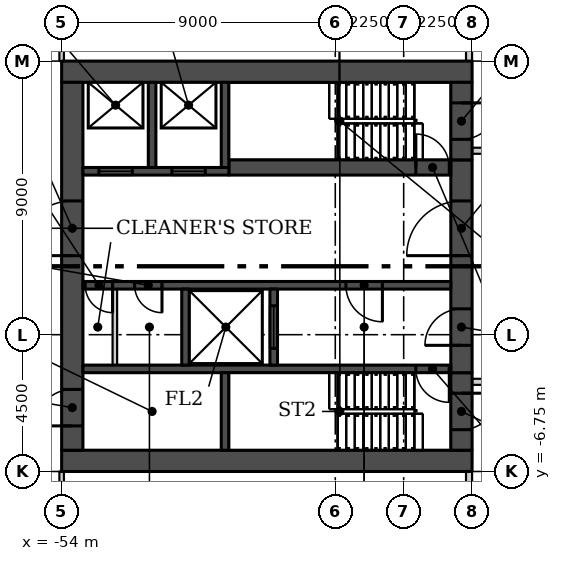
"""IFC4 building model, lengths in metres.
Left out: names, types, materials, properties, quantities, classifications, styles, units other than length and angle.
Written with IfcOpenShell. Run it as: python <this file> out.ifc"""

import sys

from ifc_helpers import new_model, si_unit, direction, frame, frame_2d, origin, place, context, subcontext, project, spatial, rectangle, extrude, element, fill, save


model = new_model("IFC4")
c1 = context("Model", 3, precision=1e-05, world=origin(), true_north=direction((0.0, 1.0)))
c2 = subcontext(c1, "Body", "Model", "MODEL_VIEW")
j1 = project(units=[si_unit("LENGTHUNIT", "METRE"), si_unit("PLANEANGLEUNIT", "RADIAN")], contexts=[c1])
p1 = place(None, origin())
s1 = spatial("IfcSite", under=j1, at=p1, CompositionType="ELEMENT")
p2 = place(p1, origin())
s2 = spatial("IfcBuilding", under=s1, at=p2, CompositionType="ELEMENT")
p3 = place(p2, origin())
s3 = spatial("IfcBuildingStorey", under=s2, at=p3, CompositionType="ELEMENT", Elevation=0.0)
p4 = place(p3, frame((-37.4, -3.8, 0.0), z_axis=(0.0, 0.0, 1.0), x_axis=(-1.0, 0.0, 0.0)))
e1 = element("IfcWall", 1, at=p4, inside=s3, PredefinedType="PARTITIONING", context=c2, shape_type="SweptSolid", body=[
    extrude(rectangle(XDim=3.1, YDim=0.2, at=frame_2d((1.55, 0.0))), origin(), (0.0, 0.0, 1.0), 6.1),
])
p5 = place(p3, frame((-40.6, 33.655, 0.0), z_axis=(0.0, 0.0, 1.0), x_axis=(0.0, -1.0, 0.0)))
e2 = element("IfcWall", 2, at=p5, inside=s3, PredefinedType="PARTITIONING", context=c2, shape_type="SweptSolid", body=[
    extrude(rectangle(XDim=26.905, YDim=0.2, at=frame_2d((13.453, 0.0))), origin(), (0.0, 0.0, 1.0), 6.1),
])
p6 = place(p3, frame((-40.6, -6.75, 0.0), z_axis=(0.0, 0.0, 1.0), x_axis=(0.0, -1.0, 0.0)))
e3 = element("IfcWall", 3, at=p6, inside=s3, PredefinedType="PARTITIONING", context=c2, shape_type="SweptSolid", body=[
    extrude(rectangle(XDim=31.405, YDim=0.2, at=frame_2d((15.703, 0.0))), origin(), (0.0, 0.0, 1.0), 6.1),
])
p7 = place(p3, frame((-40.5, 3.8, 0.0)))
e4 = element("IfcWall", 4, at=p7, inside=s3, PredefinedType="PARTITIONING", context=c2, shape_type="SweptSolid", body=[
    extrude(rectangle(XDim=3.1, YDim=0.2, at=frame_2d((1.55, 0.0))), origin(), (0.0, 0.0, 1.0), 6.1),
])
p8 = place(p3, frame((-54.0, -17.275, 0.0), z_axis=(0.0, 0.0, 1.0), x_axis=(0.0, 1.0, 0.0)))
e5 = element("IfcWall", 5, at=p8, inside=s3, PredefinedType="PARTITIONING", context=c2, shape_type="SweptSolid", body=[
    extrude(rectangle(XDim=10.525, YDim=0.15, at=frame_2d((5.262, 0.0))), origin(), (0.0, 0.0, 1.0), 6.1),
])
p9 = place(p8, frame((3.625, 0.0, 0.0)))
e6 = element("IfcOpeningElement", 6, at=p9, cuts=e5, PredefinedType="OPENING", context=c2, shape_type="SweptSolid", body=[
    extrude(rectangle(XDim=1.8, YDim=2.4, at=frame_2d((0.9, 1.2))), frame((0.0, 0.085, 0.0), z_axis=(0.0, -1.0, 0.0), x_axis=(1.0, 0.0, 0.0)), (0.0, 0.0, 1.0), 0.17),
])
p10 = place(p8, frame((8.125, 0.0, 0.0)))
e7 = element("IfcOpeningElement", 7, at=p10, cuts=e5, PredefinedType="OPENING", context=c2, shape_type="SweptSolid", body=[
    extrude(rectangle(XDim=1.8, YDim=2.4, at=frame_2d((0.9, 1.2))), frame((0.0, 0.085, 0.0), z_axis=(0.0, -1.0, 0.0), x_axis=(1.0, 0.0, 0.0)), (0.0, 0.0, 1.0), 0.17),
])
p11 = place(p3, frame((-54.0, 6.75, 0.0), z_axis=(0.0, 0.0, 1.0), x_axis=(0.0, 1.0, 0.0)))
e8 = element("IfcWall", 8, at=p11, inside=s3, PredefinedType="PARTITIONING", context=c2, shape_type="SweptSolid", body=[
    extrude(rectangle(XDim=6.025, YDim=0.15, at=frame_2d((3.012, 0.0))), origin(), (0.0, 0.0, 1.0), 6.1),
])
for number, where, z_axis, x_axis in (
    (9, (-40.5, -6.4, 0.0), (0.0, 0.0, 1.0), (-1.0, 0.0, 0.0)),
    (10, (-40.5, 6.4, 0.0), (0.0, 0.0, 1.0), (-1.0, 0.0, 0.0)),
):
    element("IfcWall", number, at=place(p3, frame(where, z_axis=z_axis, x_axis=x_axis)), inside=s3, PredefinedType="SHEAR", context=c2, shape_type="SweptSolid", body=[
        extrude(rectangle(XDim=13.5, YDim=0.7, at=frame_2d((6.75, 0.0))), origin(), (0.0, 0.0, 1.0), 6.1),
    ])
p12 = place(p3, frame((-40.85, -3.5, 0.0), z_axis=(0.0, 0.0, 1.0), x_axis=(0.0, -1.0, 0.0)))
e11 = element("IfcWall", 11, at=p12, inside=s3, PredefinedType="SHEAR", context=c2, shape_type="SweptSolid", body=[
    extrude(rectangle(XDim=2.55, YDim=0.7, at=frame_2d((1.275, 0.0))), origin(), (0.0, 0.0, 1.0), 6.1),
])
p13 = place(p12, frame((0.675, 0.0, 0.0)))
e12 = element("IfcOpeningElement", 12, at=p13, cuts=e11, PredefinedType="OPENING", context=c2, shape_type="SweptSolid", body=[
    extrude(rectangle(XDim=1.2, YDim=2.4, at=frame_2d((0.6, 1.2))), frame((0.0, 0.36, 0.0), z_axis=(0.0, -1.0, 0.0), x_axis=(1.0, 0.0, 0.0)), (0.0, 0.0, 1.0), 0.72),
])
p14 = place(p3, frame((-40.85, -3.5, 0.0), z_axis=(0.0, 0.0, 1.0), x_axis=(0.0, 1.0, 0.0)))
e13 = element("IfcWall", 13, at=p14, inside=s3, PredefinedType="SHEAR", context=c2, shape_type="SweptSolid", body=[
    extrude(rectangle(XDim=7.0, YDim=0.7, at=frame_2d((3.5, 0.0))), origin(), (0.0, 0.0, 1.0), 6.1),
])
p15 = place(p14, frame((0.9, 0.0, 0.0)))
e14 = element("IfcOpeningElement", 14, at=p15, cuts=e13, PredefinedType="OPENING", context=c2, shape_type="SweptSolid", body=[
    extrude(rectangle(XDim=1.2, YDim=2.1, at=frame_2d((0.6, 1.05))), frame((0.0, 0.36, 0.0), z_axis=(0.0, -1.0, 0.0), x_axis=(1.0, 0.0, 0.0)), (0.0, 0.0, 1.0), 0.72),
])
p16 = place(p14, frame((3.85, 0.0, 0.0)))
e15 = element("IfcOpeningElement", 15, at=p16, cuts=e13, PredefinedType="OPENING", context=c2, shape_type="SweptSolid", body=[
    extrude(rectangle(XDim=1.8, YDim=2.4, at=frame_2d((0.9, 1.2))), frame((0.0, 0.36, 0.0), z_axis=(0.0, -1.0, 0.0), x_axis=(1.0, 0.0, 0.0)), (0.0, 0.0, 1.0), 0.72),
])
p17 = place(p3, frame((-40.85, 6.05, 0.0), z_axis=(0.0, 0.0, 1.0), x_axis=(0.0, -1.0, 0.0)))
e16 = element("IfcWall", 16, at=p17, inside=s3, PredefinedType="SHEAR", context=c2, shape_type="SweptSolid", body=[
    extrude(rectangle(XDim=2.55, YDim=0.7, at=frame_2d((1.275, 0.0))), origin(), (0.0, 0.0, 1.0), 6.1),
])
p18 = place(p17, frame((0.675, 0.0, 0.0)))
e17 = element("IfcOpeningElement", 17, at=p18, cuts=e16, PredefinedType="OPENING", context=c2, shape_type="SweptSolid", body=[
    extrude(rectangle(XDim=1.2, YDim=2.4, at=frame_2d((0.6, 1.2))), frame((0.0, 0.36, 0.0), z_axis=(0.0, -1.0, 0.0), x_axis=(1.0, 0.0, 0.0)), (0.0, 0.0, 1.0), 0.72),
])
p19 = place(p3, frame((-53.65, -6.05, 0.0), z_axis=(0.0, 0.0, 1.0), x_axis=(0.0, 1.0, 0.0)))
e18 = element("IfcWall", 18, at=p19, inside=s3, PredefinedType="SHEAR", context=c2, shape_type="SweptSolid", body=[
    extrude(rectangle(XDim=12.1, YDim=0.7, at=frame_2d((6.05, 0.0))), origin(), (0.0, 0.0, 1.0), 6.1),
])
p20 = place(p19, frame((0.8, 0.0, 0.0)))
e19 = element("IfcOpeningElement", 19, at=p20, cuts=e18, PredefinedType="OPENING", context=c2, shape_type="SweptSolid", body=[
    extrude(rectangle(XDim=1.2, YDim=2.1, at=frame_2d((0.6, 1.05))), frame((0.0, 0.36, 0.0), z_axis=(0.0, -1.0, 0.0), x_axis=(1.0, 0.0, 0.0)), (0.0, 0.0, 1.0), 0.72),
])
p21 = place(p19, frame((6.4, 0.0, 0.0)))
e20 = element("IfcOpeningElement", 20, at=p21, cuts=e18, PredefinedType="OPENING", context=c2, shape_type="SweptSolid", body=[
    extrude(rectangle(XDim=1.8, YDim=2.4, at=frame_2d((0.9, 1.2))), frame((0.0, 0.36, 0.0), z_axis=(0.0, -1.0, 0.0), x_axis=(1.0, 0.0, 0.0)), (0.0, 0.0, 1.0), 0.72),
])
p22 = place(p3, frame((-41.2, -3.375, 0.0), z_axis=(0.0, 0.0, 1.0), x_axis=(-1.0, 0.0, 0.0)))
e21 = element("IfcWall", 21, at=p22, inside=s3, PredefinedType="SHEAR", context=c2, shape_type="SweptSolid", body=[
    extrude(rectangle(XDim=12.1, YDim=0.25, at=frame_2d((6.05, 0.0))), origin(), (0.0, 0.0, 1.0), 6.1),
])
p23 = place(p22, frame((0.05, 0.0, 0.0)))
e22 = element("IfcOpeningElement", 22, at=p23, cuts=e21, PredefinedType="OPENING", context=c2, shape_type="SweptSolid", body=[
    extrude(rectangle(XDim=1.1, YDim=2.1, at=frame_2d((0.55, 1.05))), frame((0.0, 0.135, 0.0), z_axis=(0.0, -1.0, 0.0), x_axis=(1.0, 0.0, 0.0)), (0.0, 0.0, 1.0), 0.27),
])
p24 = place(p3, frame((-48.625, -6.05, 0.0), z_axis=(0.0, 0.0, 1.0), x_axis=(0.0, 1.0, 0.0)))
e23 = element("IfcWall", 23, at=p24, inside=s3, PredefinedType="SHEAR", context=c2, shape_type="SweptSolid", body=[
    extrude(rectangle(XDim=2.55, YDim=0.25, at=frame_2d((1.275, 0.0))), origin(), (0.0, 0.0, 1.0), 6.1),
])
p25 = place(p3, frame((-41.2, -0.625, 0.0), z_axis=(0.0, 0.0, 1.0), x_axis=(-1.0, 0.0, 0.0)))
e24 = element("IfcWall", 24, at=p25, inside=s3, PredefinedType="SHEAR", context=c2, shape_type="SweptSolid", body=[
    extrude(rectangle(XDim=12.1, YDim=0.25, at=frame_2d((6.05, 0.0))), origin(), (0.0, 0.0, 1.0), 6.1),
])
p26 = place(p25, frame((2.25, 0.0, 0.0)))
e25 = element("IfcOpeningElement", 25, at=p26, cuts=e24, PredefinedType="OPENING", context=c2, shape_type="SweptSolid", body=[
    extrude(rectangle(XDim=1.2, YDim=2.1, at=frame_2d((0.6, 1.05))), frame((0.0, 0.135, 0.0), z_axis=(0.0, -1.0, 0.0), x_axis=(1.0, 0.0, 0.0)), (0.0, 0.0, 1.0), 0.27),
])
p27 = place(p25, frame((9.5, 0.0, 0.0)))
e26 = element("IfcOpeningElement", 26, at=p27, cuts=e24, PredefinedType="OPENING", context=c2, shape_type="SweptSolid", body=[
    extrude(rectangle(XDim=0.9, YDim=2.1, at=frame_2d((0.45, 1.05))), frame((0.0, 0.135, 0.0), z_axis=(0.0, -1.0, 0.0), x_axis=(1.0, 0.0, 0.0)), (0.0, 0.0, 1.0), 0.27),
])
p28 = place(p25, frame((11.125, 0.0, 0.0)))
e27 = element("IfcOpeningElement", 27, at=p28, cuts=e24, PredefinedType="OPENING", context=c2, shape_type="SweptSolid", body=[
    extrude(rectangle(XDim=0.9, YDim=2.1, at=frame_2d((0.45, 1.05))), frame((0.0, 0.135, 0.0), z_axis=(0.0, -1.0, 0.0), x_axis=(1.0, 0.0, 0.0)), (0.0, 0.0, 1.0), 0.27),
])
p29 = place(p3, frame((-47.025, -3.25, 0.0), z_axis=(0.0, 0.0, 1.0), x_axis=(0.0, 1.0, 0.0)))
e28 = element("IfcWall", 28, at=p29, inside=s3, PredefinedType="SHEAR", context=c2, shape_type="SweptSolid", body=[
    extrude(rectangle(XDim=2.5, YDim=0.25, at=frame_2d((1.25, 0.0))), origin(), (0.0, 0.0, 1.0), 6.1),
])
p30 = place(p29, frame((0.55, 0.0, 0.0)))
e29 = element("IfcOpeningElement", 29, at=p30, cuts=e28, PredefinedType="OPENING", context=c2, shape_type="SweptSolid", body=[
    extrude(rectangle(XDim=1.4, YDim=2.4, at=frame_2d((0.7, 1.2))), frame((0.0, 0.135, 0.0), z_axis=(0.0, -1.0, 0.0), x_axis=(1.0, 0.0, 0.0)), (0.0, 0.0, 1.0), 0.27),
])
p31 = place(p3, frame((-49.925, -3.25, 0.0), z_axis=(0.0, 0.0, 1.0), x_axis=(0.0, 1.0, 0.0)))
e30 = element("IfcWall", 30, at=p31, inside=s3, PredefinedType="SHEAR", context=c2, shape_type="SweptSolid", body=[
    extrude(rectangle(XDim=2.5, YDim=0.25, at=frame_2d((1.25, 0.0))), origin(), (0.0, 0.0, 1.0), 6.1),
])
p32 = place(p3, frame((-52.25, -3.25, 0.0), z_axis=(0.0, 0.0, 1.0), x_axis=(0.0, 1.0, 0.0)))
e31 = element("IfcWall", 31, at=p32, inside=s3, PredefinedType="PARTITIONING", context=c2, shape_type="SweptSolid", body=[
    extrude(rectangle(XDim=2.5, YDim=0.15, at=frame_2d((1.25, 0.0))), origin(), (0.0, 0.0, 1.0), 6.1),
])
p33 = place(p3, frame((-48.5, 3.25, 0.0)))
e32 = element("IfcWall", 32, at=p33, inside=s3, PredefinedType="SHEAR", context=c2, shape_type="SweptSolid", body=[
    extrude(rectangle(XDim=7.3, YDim=0.5, at=frame_2d((3.65, 0.0))), origin(), (0.0, 0.0, 1.0), 6.1),
])
p34 = place(p33, frame((6.15, 0.0, 0.0)))
e33 = element("IfcOpeningElement", 33, at=p34, cuts=e32, PredefinedType="OPENING", context=c2, shape_type="SweptSolid", body=[
    extrude(rectangle(XDim=1.1, YDim=2.1, at=frame_2d((0.55, 1.05))), frame((0.0, 0.26, 0.0), z_axis=(0.0, -1.0, 0.0), x_axis=(1.0, 0.0, 0.0)), (0.0, 0.0, 1.0), 0.52),
])
p35 = place(p3, frame((-48.5, 3.125, 0.0), z_axis=(0.0, 0.0, 1.0), x_axis=(-1.0, 0.0, 0.0)))
e34 = element("IfcWall", 34, at=p35, inside=s3, PredefinedType="SHEAR", context=c2, shape_type="SweptSolid", body=[
    extrude(rectangle(XDim=4.8, YDim=0.25, at=frame_2d((2.4, 0.0))), origin(), (0.0, 0.0, 1.0), 6.1),
])
p36 = place(p35, frame((0.775, 0.0, 0.0)))
e35 = element("IfcOpeningElement", 35, at=p36, cuts=e34, PredefinedType="OPENING", context=c2, shape_type="SweptSolid", body=[
    extrude(rectangle(XDim=1.1, YDim=2.1, at=frame_2d((0.55, 1.05))), frame((0.0, 0.135, 0.0), z_axis=(0.0, -1.0, 0.0), x_axis=(1.0, 0.0, 0.0)), (0.0, 0.0, 1.0), 0.27),
])
p37 = place(p35, frame((3.175, 0.0, 0.0)))
e36 = element("IfcOpeningElement", 36, at=p37, cuts=e34, PredefinedType="OPENING", context=c2, shape_type="SweptSolid", body=[
    extrude(rectangle(XDim=1.1, YDim=2.1, at=frame_2d((0.55, 1.05))), frame((0.0, 0.135, 0.0), z_axis=(0.0, -1.0, 0.0), x_axis=(1.0, 0.0, 0.0)), (0.0, 0.0, 1.0), 0.27),
])
for number, where, z_axis, x_axis in (
    (37, (-48.625, 3.25, 0.0), (0.0, 0.0, 1.0), (0.0, 1.0, 0.0)),
    (38, (-51.025, 3.25, 0.0), (0.0, 0.0, 1.0), (0.0, 1.0, 0.0)),
):
    element("IfcWall", number, at=place(p3, frame(where, z_axis=z_axis, x_axis=x_axis)), inside=s3, PredefinedType="SHEAR", context=c2, shape_type="SweptSolid", body=[
        extrude(rectangle(XDim=2.8, YDim=0.25, at=frame_2d((1.4, 0.0))), origin(), (0.0, 0.0, 1.0), 6.1),
    ])
p38 = place(p13, origin())
e39 = element("IfcDoor", 39, at=p38, inside=s3, OperationType="SINGLE_SWING_RIGHT", PredefinedType="DOOR", context=c2, shape_type="SweptSolid", body=[
    extrude(rectangle(XDim=1.2, YDim=2.4, at=frame_2d((0.6, 1.2))), frame((0.0, 0.025, 0.0), z_axis=(0.0, -1.0, 0.0), x_axis=(1.0, 0.0, 0.0)), (0.0, 0.0, 1.0), 0.05),
])
fill(e12, e39)
p39 = place(p15, origin())
e40 = element("IfcDoor", 40, at=p39, inside=s3, OperationType="SINGLE_SWING_LEFT", PredefinedType="DOOR", context=c2, shape_type="SweptSolid", body=[
    extrude(rectangle(XDim=1.2, YDim=2.1, at=frame_2d((0.6, 1.05))), frame((0.0, 0.025, 0.0), z_axis=(0.0, -1.0, 0.0), x_axis=(1.0, 0.0, 0.0)), (0.0, 0.0, 1.0), 0.05),
])
fill(e14, e40)
p40 = place(p16, origin())
e41 = element("IfcDoor", 41, at=p40, inside=s3, OperationType="DOUBLE_DOOR_SINGLE_SWING", PredefinedType="DOOR", context=c2, shape_type="SweptSolid", body=[
    extrude(rectangle(XDim=1.8, YDim=2.4, at=frame_2d((0.9, 1.2))), frame((0.0, 0.025, 0.0), z_axis=(0.0, -1.0, 0.0), x_axis=(1.0, 0.0, 0.0)), (0.0, 0.0, 1.0), 0.05),
])
fill(e15, e41)
p41 = place(p18, origin())
e42 = element("IfcDoor", 42, at=p41, inside=s3, OperationType="SINGLE_SWING_LEFT", PredefinedType="DOOR", context=c2, shape_type="SweptSolid", body=[
    extrude(rectangle(XDim=1.2, YDim=2.4, at=frame_2d((0.6, 1.2))), frame((0.0, 0.025, 0.0), z_axis=(0.0, -1.0, 0.0), x_axis=(1.0, 0.0, 0.0)), (0.0, 0.0, 1.0), 0.05),
])
fill(e17, e42)
p42 = place(p20, origin())
e43 = element("IfcDoor", 43, at=p42, inside=s3, OperationType="SINGLE_SWING_LEFT", PredefinedType="DOOR", context=c2, shape_type="SweptSolid", body=[
    extrude(rectangle(XDim=1.2, YDim=2.1, at=frame_2d((0.6, 1.05))), frame((0.0, 0.025, 0.0), z_axis=(0.0, -1.0, 0.0), x_axis=(1.0, 0.0, 0.0)), (0.0, 0.0, 1.0), 0.05),
])
fill(e19, e43)
p43 = place(p21, origin())
e44 = element("IfcDoor", 44, at=p43, inside=s3, OperationType="DOUBLE_DOOR_SINGLE_SWING", PredefinedType="DOOR", context=c2, shape_type="SweptSolid", body=[
    extrude(rectangle(XDim=1.8, YDim=2.4, at=frame_2d((0.9, 1.2))), frame((0.0, 0.025, 0.0), z_axis=(0.0, -1.0, 0.0), x_axis=(1.0, 0.0, 0.0)), (0.0, 0.0, 1.0), 0.05),
])
fill(e20, e44)
p44 = place(p23, origin())
e45 = element("IfcDoor", 45, at=p44, inside=s3, OperationType="SINGLE_SWING_LEFT", PredefinedType="DOOR", context=c2, shape_type="SweptSolid", body=[
    extrude(rectangle(XDim=1.1, YDim=2.1, at=frame_2d((0.55, 1.05))), frame((0.0, 0.025, 0.0), z_axis=(0.0, -1.0, 0.0), x_axis=(1.0, 0.0, 0.0)), (0.0, 0.0, 1.0), 0.05),
])
fill(e22, e45)
p45 = place(p26, origin())
e46 = element("IfcDoor", 46, at=p45, inside=s3, OperationType="SINGLE_SWING_LEFT", PredefinedType="DOOR", context=c2, shape_type="SweptSolid", body=[
    extrude(rectangle(XDim=1.2, YDim=2.1, at=frame_2d((0.6, 1.05))), frame((0.0, 0.025, 0.0), z_axis=(0.0, -1.0, 0.0), x_axis=(1.0, 0.0, 0.0)), (0.0, 0.0, 1.0), 0.05),
])
fill(e25, e46)
p46 = place(p27, origin())
e47 = element("IfcDoor", 47, at=p46, inside=s3, OperationType="SINGLE_SWING_RIGHT", PredefinedType="DOOR", context=c2, shape_type="SweptSolid", body=[
    extrude(rectangle(XDim=0.9, YDim=2.1, at=frame_2d((0.45, 1.05))), frame((0.0, 0.025, 0.0), z_axis=(0.0, -1.0, 0.0), x_axis=(1.0, 0.0, 0.0)), (0.0, 0.0, 1.0), 0.05),
])
fill(e26, e47)
p47 = place(p28, origin())
e48 = element("IfcDoor", 48, at=p47, inside=s3, OperationType="SINGLE_SWING_RIGHT", PredefinedType="DOOR", context=c2, shape_type="SweptSolid", body=[
    extrude(rectangle(XDim=0.9, YDim=2.1, at=frame_2d((0.45, 1.05))), frame((0.0, 0.025, 0.0), z_axis=(0.0, -1.0, 0.0), x_axis=(1.0, 0.0, 0.0)), (0.0, 0.0, 1.0), 0.05),
])
fill(e27, e48)
p48 = place(p30, origin())
e49 = element("IfcDoor", 49, at=p48, inside=s3, OperationType="SLIDING_TO_LEFT", PredefinedType="DOOR", context=c2, shape_type="SweptSolid", body=[
    extrude(rectangle(XDim=1.4, YDim=2.4, at=frame_2d((0.7, 1.2))), frame((0.0, 0.025, 0.0), z_axis=(0.0, -1.0, 0.0), x_axis=(1.0, 0.0, 0.0)), (0.0, 0.0, 1.0), 0.05),
])
fill(e29, e49)
p49 = place(p34, origin())
e50 = element("IfcDoor", 50, at=p49, inside=s3, OperationType="SINGLE_SWING_RIGHT", PredefinedType="DOOR", context=c2, shape_type="SweptSolid", body=[
    extrude(rectangle(XDim=1.1, YDim=2.1, at=frame_2d((0.55, 1.05))), frame((0.0, 0.025, 0.0), z_axis=(0.0, -1.0, 0.0), x_axis=(1.0, 0.0, 0.0)), (0.0, 0.0, 1.0), 0.05),
])
fill(e33, e50)
p50 = place(p36, origin())
e51 = element("IfcDoor", 51, at=p50, inside=s3, OperationType="SLIDING_TO_LEFT", PredefinedType="DOOR", context=c2, shape_type="SweptSolid", body=[
    extrude(rectangle(XDim=1.1, YDim=2.1, at=frame_2d((0.55, 1.05))), frame((0.0, 0.025, 0.0), z_axis=(0.0, -1.0, 0.0), x_axis=(1.0, 0.0, 0.0)), (0.0, 0.0, 1.0), 0.05),
])
fill(e35, e51)
p51 = place(p37, origin())
e52 = element("IfcDoor", 52, at=p51, inside=s3, OperationType="SLIDING_TO_LEFT", PredefinedType="DOOR", context=c2, shape_type="SweptSolid", body=[
    extrude(rectangle(XDim=1.1, YDim=2.1, at=frame_2d((0.55, 1.05))), frame((0.0, 0.025, 0.0), z_axis=(0.0, -1.0, 0.0), x_axis=(1.0, 0.0, 0.0)), (0.0, 0.0, 1.0), 0.05),
])
fill(e36, e52)
save(model, sys.argv[1])
